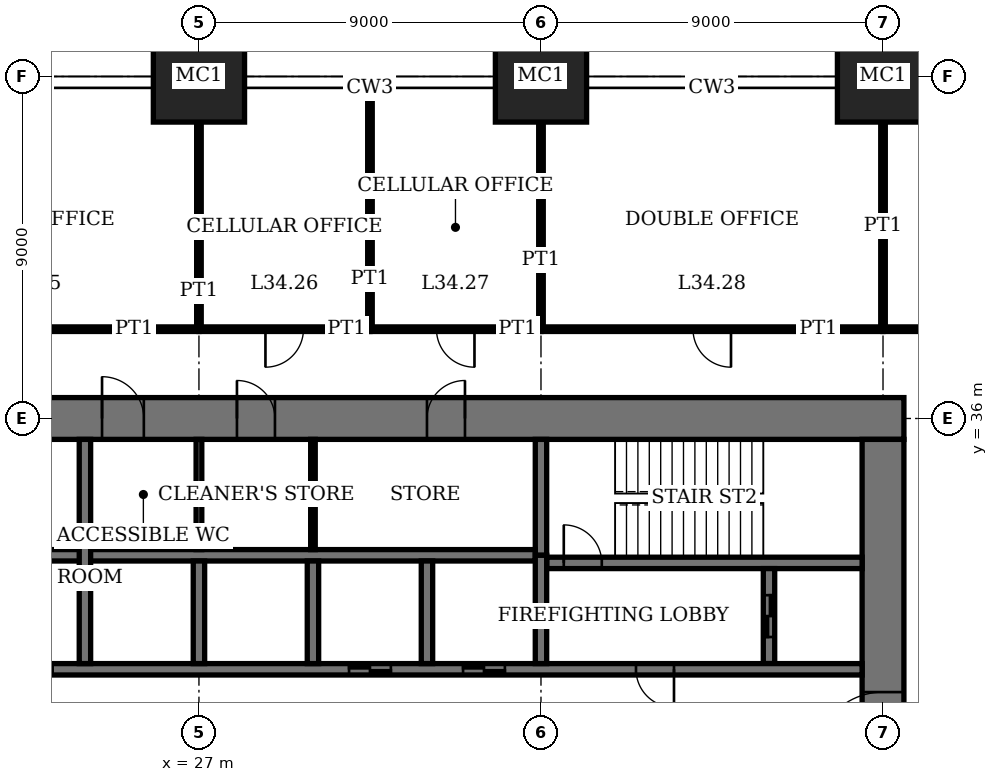
"""IFC4 building model, lengths in metres.
Left out: names, types, materials, properties, quantities, classifications, styles, units other than length and angle.
Written with IfcOpenShell. Run it as: python <this file> out.ifc"""

import sys

from ifc_helpers import new_model, si_unit, direction, frame, frame_2d, origin, origin_2d, place, context, subcontext, project, spatial, rectangle, extrude, element, fill, save


model = new_model("IFC4")
c1 = context("Model", 3, precision=1e-05, world=origin(), true_north=direction((0.0, 1.0)))
c2 = subcontext(c1, "Body", "Model", "MODEL_VIEW")
j1 = project(units=[si_unit("LENGTHUNIT", "METRE"), si_unit("PLANEANGLEUNIT", "RADIAN")], contexts=[c1])
p1 = place(None, origin())
s1 = spatial("IfcSite", under=j1, at=p1, CompositionType="ELEMENT")
p2 = place(p1, origin())
s2 = spatial("IfcBuilding", under=s1, at=p2, CompositionType="ELEMENT")
p3 = place(p2, frame((0.0, 0.0, 141.0)))
s3 = spatial("IfcBuildingStorey", under=s2, at=p3, CompositionType="ELEMENT", Elevation=141.0)
for number, where, z_axis, x_axis in (
    (1, (27.0, 45.0, 0.0), (0.0, 0.0, 1.0), (1.0, 0.0, 0.0)),
    (2, (36.0, 45.0, 0.0), (0.0, 0.0, 1.0), (1.0, 0.0, 0.0)),
    (3, (45.0, 45.0, 0.0), (0.0, 0.0, 1.0), (1.0, 0.0, 0.0)),
):
    element("IfcColumn", number, at=place(p3, frame(where, z_axis=z_axis, x_axis=x_axis)), inside=s3, PredefinedType="COLUMN", context=c2, shape_type="SweptSolid", body=[
        extrude(rectangle(XDim=2.4, YDim=2.4, at=origin_2d()), origin(), (0.0, 0.0, 1.0), 4.0),
    ])
p4 = place(p3, frame((45.55, 36.0, 0.0), z_axis=(0.0, 0.0, 1.0), x_axis=(-1.0, 0.0, 0.0)))
e4 = element("IfcWall", 4, at=p4, inside=s3, PredefinedType="SHEAR", context=c2, shape_type="SweptSolid", body=[
    extrude(rectangle(XDim=28.1, YDim=1.1, at=frame_2d((14.05, 0.0))), origin(), (0.0, 0.0, 1.0), 4.0),
])
p5 = place(p4, frame((11.55, 0.0, 0.0)))
e5 = element("IfcOpeningElement", 5, at=p5, cuts=e4, PredefinedType="OPENING", context=c2, shape_type="SweptSolid", body=[
    extrude(rectangle(XDim=1.0, YDim=2.4, at=frame_2d((0.5, 1.2))), frame((0.0, 0.56, 0.0), z_axis=(0.0, -1.0, 0.0), x_axis=(1.0, 0.0, 0.0)), (0.0, 0.0, 1.0), 1.12),
])
p6 = place(p4, frame((16.55, 0.0, 0.0)))
e6 = element("IfcOpeningElement", 6, at=p6, cuts=e4, PredefinedType="OPENING", context=c2, shape_type="SweptSolid", body=[
    extrude(rectangle(XDim=1.0, YDim=2.4, at=frame_2d((0.5, 1.2))), frame((0.0, 0.56, 0.0), z_axis=(0.0, -1.0, 0.0), x_axis=(1.0, 0.0, 0.0)), (0.0, 0.0, 1.0), 1.12),
])
p7 = place(p4, frame((20.0, 0.0, 0.0)))
e7 = element("IfcOpeningElement", 7, at=p7, cuts=e4, PredefinedType="OPENING", context=c2, shape_type="SweptSolid", body=[
    extrude(rectangle(XDim=1.1, YDim=2.4, at=frame_2d((0.55, 1.2))), frame((0.0, 0.56, 0.0), z_axis=(0.0, -1.0, 0.0), x_axis=(1.0, 0.0, 0.0)), (0.0, 0.0, 1.0), 1.12),
])
p8 = place(p4, frame((24.05, 0.0, 0.0)))
e8 = element("IfcOpeningElement", 8, at=p8, cuts=e4, PredefinedType="OPENING", context=c2, shape_type="SweptSolid", body=[
    extrude(rectangle(XDim=1.0, YDim=2.4, at=frame_2d((0.5, 1.2))), frame((0.0, 0.56, 0.0), z_axis=(0.0, -1.0, 0.0), x_axis=(1.0, 0.0, 0.0)), (0.0, 0.0, 1.0), 1.12),
])
p9 = place(p3, frame((45.0, 18.55, 0.0), z_axis=(0.0, 0.0, 1.0), x_axis=(0.0, 1.0, 0.0)))
e9 = element("IfcWall", 9, at=p9, inside=s3, PredefinedType="SHEAR", context=c2, shape_type="SweptSolid", body=[
    extrude(rectangle(XDim=16.9, YDim=1.1, at=frame_2d((8.45, 0.0))), origin(), (0.0, 0.0, 1.0), 4.0),
])
p10 = place(p9, frame((8.45, 0.0, 0.0)))
e10 = element("IfcOpeningElement", 10, at=p10, cuts=e9, PredefinedType="OPENING", context=c2, shape_type="SweptSolid", body=[
    extrude(rectangle(XDim=1.8, YDim=2.4, at=frame_2d((0.9, 1.2))), frame((0.0, 0.56, 0.0), z_axis=(0.0, -1.0, 0.0), x_axis=(1.0, 0.0, 0.0)), (0.0, 0.0, 1.0), 1.12),
])
p11 = place(p3, frame((36.15, 32.2, 0.0), z_axis=(0.0, 0.0, 1.0), x_axis=(1.0, 0.0, 0.0)))
e11 = element("IfcWall", 11, at=p11, inside=s3, PredefinedType="SHEAR", context=c2, shape_type="SweptSolid", body=[
    extrude(rectangle(XDim=8.3, YDim=0.3, at=frame_2d((4.15, 0.0))), origin(), (0.0, 0.0, 1.0), 4.0),
])
p12 = place(p11, frame((0.45, 0.0, 0.0)))
e12 = element("IfcOpeningElement", 12, at=p12, cuts=e11, PredefinedType="OPENING", context=c2, shape_type="SweptSolid", body=[
    extrude(rectangle(XDim=1.0, YDim=2.4, at=frame_2d((0.5, 1.2))), frame((0.0, 0.16, 0.0), z_axis=(0.0, -1.0, 0.0), x_axis=(1.0, 0.0, 0.0)), (0.0, 0.0, 1.0), 0.32),
])
p13 = place(p3, frame((36.0, 32.4, 0.0), z_axis=(0.0, 0.0, 1.0), x_axis=(0.0, 1.0, 0.0)))
e13 = element("IfcWall", 13, at=p13, inside=s3, PredefinedType="SHEAR", context=c2, shape_type="SweptSolid", body=[
    extrude(rectangle(XDim=3.05, YDim=0.3, at=frame_2d((1.525, 0.0))), origin(), (0.0, 0.0, 1.0), 4.0),
])
p14 = place(p3, frame((42.0, 29.55, 0.0), z_axis=(0.0, 0.0, 1.0), x_axis=(0.0, 1.0, 0.0)))
e14 = element("IfcWall", 14, at=p14, inside=s3, PredefinedType="SHEAR", context=c2, shape_type="SweptSolid", body=[
    extrude(rectangle(XDim=2.5, YDim=0.3, at=frame_2d((1.25, 0.0))), origin(), (0.0, 0.0, 1.0), 4.0),
])
p15 = place(p14, frame((0.7, 0.0, 0.0)))
e15 = element("IfcOpeningElement", 15, at=p15, cuts=e14, PredefinedType="OPENING", context=c2, shape_type="SweptSolid", body=[
    extrude(rectangle(XDim=1.1, YDim=2.4, at=frame_2d((0.55, 1.2))), frame((0.0, 0.16, 0.0), z_axis=(0.0, -1.0, 0.0), x_axis=(1.0, 0.0, 0.0)), (0.0, 0.0, 1.0), 0.32),
])
p16 = place(p3, frame((18.55, 29.4, 0.0), z_axis=(0.0, 0.0, 1.0), x_axis=(1.0, 0.0, 0.0)))
e16 = element("IfcWall", 16, at=p16, inside=s3, PredefinedType="SHEAR", context=c2, shape_type="SweptSolid", body=[
    extrude(rectangle(XDim=25.9, YDim=0.3, at=frame_2d((12.95, 0.0))), origin(), (0.0, 0.0, 1.0), 4.0),
])
p17 = place(p16, frame((19.95, 0.0, 0.0)))
e17 = element("IfcOpeningElement", 17, at=p17, cuts=e16, PredefinedType="OPENING", context=c2, shape_type="SweptSolid", body=[
    extrude(rectangle(XDim=1.0, YDim=2.4, at=frame_2d((0.5, 1.2))), frame((0.0, 0.16, 0.0), z_axis=(0.0, -1.0, 0.0), x_axis=(1.0, 0.0, 0.0)), (0.0, 0.0, 1.0), 0.32),
])
p18 = place(p16, frame((0.5, 0.0, 0.0)))
e18 = element("IfcOpeningElement", 18, at=p18, cuts=e16, PredefinedType="OPENING", context=c2, shape_type="SweptSolid", body=[
    extrude(rectangle(XDim=0.9, YDim=2.1, at=frame_2d((0.45, 1.05))), frame((0.0, 0.16, 0.0), z_axis=(0.0, -1.0, 0.0), x_axis=(1.0, 0.0, 0.0)), (0.0, 0.0, 1.0), 0.32),
])
p19 = place(p16, frame((15.4, 0.0, 0.0)))
e19 = element("IfcOpeningElement", 19, at=p19, cuts=e16, PredefinedType="OPENING", context=c2, shape_type="SweptSolid", body=[
    extrude(rectangle(XDim=1.1, YDim=2.4, at=frame_2d((0.55, 1.2))), frame((0.0, 0.16, 0.0), z_axis=(0.0, -1.0, 0.0), x_axis=(1.0, 0.0, 0.0)), (0.0, 0.0, 1.0), 0.32),
])
p20 = place(p16, frame((12.4, 0.0, 0.0)))
e20 = element("IfcOpeningElement", 20, at=p20, cuts=e16, PredefinedType="OPENING", context=c2, shape_type="SweptSolid", body=[
    extrude(rectangle(XDim=1.1, YDim=2.4, at=frame_2d((0.55, 1.2))), frame((0.0, 0.16, 0.0), z_axis=(0.0, -1.0, 0.0), x_axis=(1.0, 0.0, 0.0)), (0.0, 0.0, 1.0), 0.32),
])
p21 = place(p16, frame((3.3, 0.0, 0.0)))
e21 = element("IfcOpeningElement", 21, at=p21, cuts=e16, PredefinedType="OPENING", context=c2, shape_type="SweptSolid", body=[
    extrude(rectangle(XDim=1.3, YDim=2.4, at=frame_2d((0.65, 1.2))), frame((0.0, 0.16, 0.0), z_axis=(0.0, -1.0, 0.0), x_axis=(1.0, 0.0, 0.0)), (0.0, 0.0, 1.0), 0.32),
])
p22 = place(p3, frame((18.55, 32.4, 0.0), z_axis=(0.0, 0.0, 1.0), x_axis=(1.0, 0.0, 0.0)))
e22 = element("IfcWall", 22, at=p22, inside=s3, PredefinedType="SHEAR", context=c2, shape_type="SweptSolid", body=[
    extrude(rectangle(XDim=17.3, YDim=0.3, at=frame_2d((8.65, 0.0))), origin(), (0.0, 0.0, 1.0), 4.0),
])
for number, where, z_axis, x_axis in (
    (23, (33.0, 29.55, 0.0), (0.0, 0.0, 1.0), (0.0, 1.0, 0.0)),
    (24, (30.0, 29.55, 0.0), (0.0, 0.0, 1.0), (0.0, 1.0, 0.0)),
    (25, (27.0, 29.55, 0.0), (0.0, 0.0, 1.0), (0.0, 1.0, 0.0)),
):
    element("IfcWall", number, at=place(p3, frame(where, z_axis=z_axis, x_axis=x_axis)), inside=s3, PredefinedType="SHEAR", context=c2, shape_type="SweptSolid", body=[
        extrude(rectangle(XDim=2.7, YDim=0.3, at=frame_2d((1.35, 0.0))), origin(), (0.0, 0.0, 1.0), 4.0),
    ])
p23 = place(p3, frame((24.0, 29.55, 0.0), z_axis=(0.0, 0.0, 1.0), x_axis=(0.0, 1.0, 0.0)))
e26 = element("IfcWall", 26, at=p23, inside=s3, PredefinedType="SHEAR", context=c2, shape_type="SweptSolid", body=[
    extrude(rectangle(XDim=5.9, YDim=0.3, at=frame_2d((2.95, 0.0))), origin(), (0.0, 0.0, 1.0), 4.0),
])
p24 = place(p3, frame((36.0, 29.55, 0.0), z_axis=(0.0, 0.0, 1.0), x_axis=(0.0, 1.0, 0.0)))
e27 = element("IfcWall", 27, at=p24, inside=s3, PredefinedType="SHEAR", context=c2, shape_type="SweptSolid", body=[
    extrude(rectangle(XDim=2.85, YDim=0.3, at=frame_2d((1.425, 0.0))), origin(), (0.0, 0.0, 1.0), 4.0),
])
p25 = place(p3, frame((18.0, 38.35, 0.0), z_axis=(0.0, 0.0, 1.0), x_axis=(1.0, 0.0, 0.0)))
e28 = element("IfcWall", 28, at=p25, inside=s3, PredefinedType="PARTITIONING", context=c2, shape_type="SweptSolid", body=[
    extrude(rectangle(XDim=9.0, YDim=0.12, at=frame_2d((4.5, 0.0))), origin(), (0.0, 0.0, 1.0), 3.75),
])
p26 = place(p25, frame((4.0, 0.0, 0.0)))
e29 = element("IfcOpeningElement", 29, at=p26, cuts=e28, PredefinedType="OPENING", context=c2, shape_type="SweptSolid", body=[
    extrude(rectangle(XDim=1.0, YDim=2.4, at=frame_2d((0.5, 1.2))), frame((0.0, 0.07, 0.0), z_axis=(0.0, -1.0, 0.0), x_axis=(1.0, 0.0, 0.0)), (0.0, 0.0, 1.0), 0.14),
])
p27 = place(p3, frame((27.0, 38.35, 0.0), z_axis=(0.0, 0.0, 1.0), x_axis=(1.0, 0.0, 0.0)))
e30 = element("IfcWall", 30, at=p27, inside=s3, PredefinedType="PARTITIONING", context=c2, shape_type="SweptSolid", body=[
    extrude(rectangle(XDim=4.5, YDim=0.12, at=frame_2d((2.25, 0.0))), origin(), (0.0, 0.0, 1.0), 3.75),
])
p28 = place(p27, frame((1.75, 0.0, 0.0)))
e31 = element("IfcOpeningElement", 31, at=p28, cuts=e30, PredefinedType="OPENING", context=c2, shape_type="SweptSolid", body=[
    extrude(rectangle(XDim=1.0, YDim=2.4, at=frame_2d((0.5, 1.2))), frame((0.0, 0.07, 0.0), z_axis=(0.0, -1.0, 0.0), x_axis=(1.0, 0.0, 0.0)), (0.0, 0.0, 1.0), 0.14),
])
p29 = place(p3, frame((31.5, 38.35, 0.0), z_axis=(0.0, 0.0, 1.0), x_axis=(1.0, 0.0, 0.0)))
e32 = element("IfcWall", 32, at=p29, inside=s3, PredefinedType="PARTITIONING", context=c2, shape_type="SweptSolid", body=[
    extrude(rectangle(XDim=4.5, YDim=0.12, at=frame_2d((2.25, 0.0))), origin(), (0.0, 0.0, 1.0), 3.75),
])
p30 = place(p29, frame((1.75, 0.0, 0.0)))
e33 = element("IfcOpeningElement", 33, at=p30, cuts=e32, PredefinedType="OPENING", context=c2, shape_type="SweptSolid", body=[
    extrude(rectangle(XDim=1.0, YDim=2.4, at=frame_2d((0.5, 1.2))), frame((0.0, 0.07, 0.0), z_axis=(0.0, -1.0, 0.0), x_axis=(1.0, 0.0, 0.0)), (0.0, 0.0, 1.0), 0.14),
])
p31 = place(p3, frame((36.0, 38.35, 0.0), z_axis=(0.0, 0.0, 1.0), x_axis=(1.0, 0.0, 0.0)))
e34 = element("IfcWall", 34, at=p31, inside=s3, PredefinedType="PARTITIONING", context=c2, shape_type="SweptSolid", body=[
    extrude(rectangle(XDim=9.0, YDim=0.12, at=frame_2d((4.5, 0.0))), origin(), (0.0, 0.0, 1.0), 3.75),
])
p32 = place(p31, frame((4.0, 0.0, 0.0)))
e35 = element("IfcOpeningElement", 35, at=p32, cuts=e34, PredefinedType="OPENING", context=c2, shape_type="SweptSolid", body=[
    extrude(rectangle(XDim=1.0, YDim=2.4, at=frame_2d((0.5, 1.2))), frame((0.0, 0.07, 0.0), z_axis=(0.0, -1.0, 0.0), x_axis=(1.0, 0.0, 0.0)), (0.0, 0.0, 1.0), 0.14),
])
p33 = place(p3, frame((45.0, 38.35, 0.0), z_axis=(0.0, 0.0, 1.0), x_axis=(1.0, 0.0, 0.0)))
e36 = element("IfcWall", 36, at=p33, inside=s3, PredefinedType="PARTITIONING", context=c2, shape_type="SweptSolid", body=[
    extrude(rectangle(XDim=9.0, YDim=0.12, at=frame_2d((4.5, 0.0))), origin(), (0.0, 0.0, 1.0), 3.75),
])
p34 = place(p33, frame((4.0, 0.0, 0.0)))
e37 = element("IfcOpeningElement", 37, at=p34, cuts=e36, PredefinedType="OPENING", context=c2, shape_type="SweptSolid", body=[
    extrude(rectangle(XDim=1.0, YDim=2.4, at=frame_2d((0.5, 1.2))), frame((0.0, 0.07, 0.0), z_axis=(0.0, -1.0, 0.0), x_axis=(1.0, 0.0, 0.0)), (0.0, 0.0, 1.0), 0.14),
])
p35 = place(p3, frame((27.0, 38.35, 0.0), z_axis=(0.0, 0.0, 1.0), x_axis=(0.0, 1.0, 0.0)))
e38 = element("IfcWall", 38, at=p35, inside=s3, PredefinedType="PARTITIONING", context=c2, shape_type="SweptSolid", body=[
    extrude(rectangle(XDim=5.45, YDim=0.12, at=frame_2d((2.725, 0.0))), origin(), (0.0, 0.0, 1.0), 3.05),
])
p36 = place(p3, frame((31.5, 38.35, 0.0), z_axis=(0.0, 0.0, 1.0), x_axis=(0.0, 1.0, 0.0)))
e39 = element("IfcWall", 39, at=p36, inside=s3, PredefinedType="PARTITIONING", context=c2, shape_type="SweptSolid", body=[
    extrude(rectangle(XDim=6.34, YDim=0.12, at=frame_2d((3.17, 0.0))), origin(), (0.0, 0.0, 1.0), 3.75),
])
for number, where, z_axis, x_axis in (
    (40, (36.0, 38.35, 0.0), (0.0, 0.0, 1.0), (0.0, 1.0, 0.0)),
    (41, (45.0, 38.35, 0.0), (0.0, 0.0, 1.0), (0.0, 1.0, 0.0)),
):
    element("IfcWall", number, at=place(p3, frame(where, z_axis=z_axis, x_axis=x_axis)), inside=s3, PredefinedType="PARTITIONING", context=c2, shape_type="SweptSolid", body=[
        extrude(rectangle(XDim=5.45, YDim=0.12, at=frame_2d((2.725, 0.0))), origin(), (0.0, 0.0, 1.0), 3.05),
    ])
p37 = place(p3, frame((30.0, 32.55, 0.0), z_axis=(0.0, 0.0, 1.0), x_axis=(0.0, 1.0, 0.0)))
e42 = element("IfcWall", 42, at=p37, inside=s3, PredefinedType="PARTITIONING", context=c2, shape_type="SweptSolid", body=[
    extrude(rectangle(XDim=2.9, YDim=0.12, at=frame_2d((1.45, 0.0))), origin(), (0.0, 0.0, 1.0), 3.75),
])
p38 = place(p3, frame((27.0, 32.55, 0.0), z_axis=(0.0, 0.0, 1.0), x_axis=(0.0, 1.0, 0.0)))
e43 = element("IfcWall", 43, at=p38, inside=s3, PredefinedType="PARTITIONING", context=c2, shape_type="SweptSolid", body=[
    extrude(rectangle(XDim=2.9, YDim=0.15, at=frame_2d((1.45, 0.0))), origin(), (0.0, 0.0, 1.0), 3.75),
])
p39 = place(p10, origin())
e44 = element("IfcDoor", 44, at=p39, inside=s3, OperationType="DOUBLE_DOOR_DOUBLE_SWING", PredefinedType="DOOR", context=c2, shape_type="SweptSolid", body=[
    extrude(rectangle(XDim=1.8, YDim=2.4, at=frame_2d((0.9, 1.2))), frame((0.0, 0.03, 0.0), z_axis=(0.0, -1.0, 0.0), x_axis=(1.0, 0.0, 0.0)), (0.0, 0.0, 1.0), 0.06),
    extrude(rectangle(XDim=0.04, YDim=2.4, at=frame_2d((0.02, 1.2))), frame((0.0, 0.55, 0.0), z_axis=(0.0, -1.0, 0.0), x_axis=(1.0, 0.0, 0.0)), (0.0, 0.0, 1.0), 1.1),
    extrude(rectangle(XDim=0.04, YDim=2.4, at=frame_2d((1.78, 1.2))), frame((0.0, 0.55, 0.0), z_axis=(0.0, -1.0, 0.0), x_axis=(1.0, 0.0, 0.0)), (0.0, 0.0, 1.0), 1.1),
    extrude(rectangle(XDim=1.8, YDim=0.04, at=frame_2d((0.9, 2.38))), frame((0.0, 0.55, 0.0), z_axis=(0.0, -1.0, 0.0), x_axis=(1.0, 0.0, 0.0)), (0.0, 0.0, 1.0), 1.1),
])
fill(e10, e44)
p40 = place(p5, origin())
e45 = element("IfcDoor", 45, at=p40, inside=s3, OperationType="SINGLE_SWING_LEFT", PredefinedType="DOOR", context=c2, shape_type="SweptSolid", body=[
    extrude(rectangle(XDim=1.0, YDim=2.4, at=frame_2d((0.5, 1.2))), frame((0.0, 0.025, 0.0), z_axis=(0.0, -1.0, 0.0), x_axis=(1.0, 0.0, 0.0)), (0.0, 0.0, 1.0), 0.05),
    extrude(rectangle(XDim=0.04, YDim=2.4, at=frame_2d((0.02, 1.2))), frame((0.0, 0.4, 0.0), z_axis=(0.0, -1.0, 0.0), x_axis=(1.0, 0.0, 0.0)), (0.0, 0.0, 1.0), 0.8),
    extrude(rectangle(XDim=0.04, YDim=2.4, at=frame_2d((0.98, 1.2))), frame((0.0, 0.4, 0.0), z_axis=(0.0, -1.0, 0.0), x_axis=(1.0, 0.0, 0.0)), (0.0, 0.0, 1.0), 0.8),
    extrude(rectangle(XDim=1.0, YDim=0.04, at=frame_2d((0.5, 2.38))), frame((0.0, 0.4, 0.0), z_axis=(0.0, -1.0, 0.0), x_axis=(1.0, 0.0, 0.0)), (0.0, 0.0, 1.0), 0.8),
])
fill(e5, e45)
p41 = place(p6, origin())
e46 = element("IfcDoor", 46, at=p41, inside=s3, OperationType="SINGLE_SWING_RIGHT", PredefinedType="DOOR", context=c2, shape_type="SweptSolid", body=[
    extrude(rectangle(XDim=1.0, YDim=2.4, at=frame_2d((0.5, 1.2))), frame((0.0, 0.025, 0.0), z_axis=(0.0, -1.0, 0.0), x_axis=(1.0, 0.0, 0.0)), (0.0, 0.0, 1.0), 0.05),
    extrude(rectangle(XDim=0.04, YDim=2.4, at=frame_2d((0.02, 1.2))), frame((0.0, 0.4, 0.0), z_axis=(0.0, -1.0, 0.0), x_axis=(1.0, 0.0, 0.0)), (0.0, 0.0, 1.0), 0.8),
    extrude(rectangle(XDim=0.04, YDim=2.4, at=frame_2d((0.98, 1.2))), frame((0.0, 0.4, 0.0), z_axis=(0.0, -1.0, 0.0), x_axis=(1.0, 0.0, 0.0)), (0.0, 0.0, 1.0), 0.8),
    extrude(rectangle(XDim=1.0, YDim=0.04, at=frame_2d((0.5, 2.38))), frame((0.0, 0.4, 0.0), z_axis=(0.0, -1.0, 0.0), x_axis=(1.0, 0.0, 0.0)), (0.0, 0.0, 1.0), 0.8),
])
fill(e6, e46)
p42 = place(p7, origin())
e47 = element("IfcDoor", 47, at=p42, inside=s3, OperationType="SINGLE_SWING_RIGHT", PredefinedType="DOOR", context=c2, shape_type="SweptSolid", body=[
    extrude(rectangle(XDim=1.1, YDim=2.4, at=frame_2d((0.55, 1.2))), frame((0.0, 0.025, 0.0), z_axis=(0.0, -1.0, 0.0), x_axis=(1.0, 0.0, 0.0)), (0.0, 0.0, 1.0), 0.05),
    extrude(rectangle(XDim=0.04, YDim=2.4, at=frame_2d((0.02, 1.2))), frame((0.0, 0.44, 0.0), z_axis=(0.0, -1.0, 0.0), x_axis=(1.0, 0.0, 0.0)), (0.0, 0.0, 1.0), 0.88),
    extrude(rectangle(XDim=0.04, YDim=2.4, at=frame_2d((1.08, 1.2))), frame((0.0, 0.44, 0.0), z_axis=(0.0, -1.0, 0.0), x_axis=(1.0, 0.0, 0.0)), (0.0, 0.0, 1.0), 0.88),
    extrude(rectangle(XDim=1.1, YDim=0.04, at=frame_2d((0.55, 2.38))), frame((0.0, 0.44, 0.0), z_axis=(0.0, -1.0, 0.0), x_axis=(1.0, 0.0, 0.0)), (0.0, 0.0, 1.0), 0.88),
])
fill(e7, e47)
p43 = place(p12, origin())
e48 = element("IfcDoor", 48, at=p43, inside=s3, OperationType="SINGLE_SWING_RIGHT", PredefinedType="DOOR", context=c2, shape_type="SweptSolid", body=[
    extrude(rectangle(XDim=1.0, YDim=2.4, at=frame_2d((0.5, 1.2))), frame((0.0, 0.03, 0.0), z_axis=(0.0, -1.0, 0.0), x_axis=(1.0, 0.0, 0.0)), (0.0, 0.0, 1.0), 0.06),
])
fill(e12, e48)
p44 = place(p17, origin())
e49 = element("IfcDoor", 49, at=p44, inside=s3, OperationType="SINGLE_SWING_RIGHT", PredefinedType="DOOR", context=c2, shape_type="SweptSolid", body=[
    extrude(rectangle(XDim=1.0, YDim=2.4, at=frame_2d((0.5, 1.2))), frame((0.0, 0.03, 0.0), z_axis=(0.0, -1.0, 0.0), x_axis=(1.0, 0.0, 0.0)), (0.0, 0.0, 1.0), 0.06),
])
fill(e17, e49)
p45 = place(p28, origin())
e50 = element("IfcDoor", 50, at=p45, inside=s3, OperationType="SINGLE_SWING_LEFT", PredefinedType="DOOR", context=c2, shape_type="SweptSolid", body=[
    extrude(rectangle(XDim=1.0, YDim=2.4, at=frame_2d((0.5, 1.2))), frame((0.0, 0.025, 0.0), z_axis=(0.0, -1.0, 0.0), x_axis=(1.0, 0.0, 0.0)), (0.0, 0.0, 1.0), 0.05),
])
fill(e31, e50)
p46 = place(p30, origin())
e51 = element("IfcDoor", 51, at=p46, inside=s3, OperationType="SINGLE_SWING_RIGHT", PredefinedType="DOOR", context=c2, shape_type="SweptSolid", body=[
    extrude(rectangle(XDim=1.0, YDim=2.4, at=frame_2d((0.5, 1.2))), frame((0.0, 0.025, 0.0), z_axis=(0.0, -1.0, 0.0), x_axis=(1.0, 0.0, 0.0)), (0.0, 0.0, 1.0), 0.05),
])
fill(e33, e51)
p47 = place(p32, origin())
e52 = element("IfcDoor", 52, at=p47, inside=s3, OperationType="SINGLE_SWING_RIGHT", PredefinedType="DOOR", context=c2, shape_type="SweptSolid", body=[
    extrude(rectangle(XDim=1.0, YDim=2.4, at=frame_2d((0.5, 1.2))), frame((0.0, 0.025, 0.0), z_axis=(0.0, -1.0, 0.0), x_axis=(1.0, 0.0, 0.0)), (0.0, 0.0, 1.0), 0.05),
])
fill(e35, e52)
p48 = place(p19, origin())
e53 = element("IfcDoor", 53, at=p48, inside=s3, OperationType="DOUBLE_DOOR_SLIDING", PredefinedType="DOOR", context=c2, shape_type="SweptSolid", body=[
    extrude(rectangle(XDim=1.1, YDim=2.4, at=frame_2d((0.55, 1.2))), frame((0.0, 0.02, 0.0), z_axis=(0.0, -1.0, 0.0), x_axis=(1.0, 0.0, 0.0)), (0.0, 0.0, 1.0), 0.04),
])
fill(e19, e53)
p49 = place(p20, origin())
e54 = element("IfcDoor", 54, at=p49, inside=s3, OperationType="DOUBLE_DOOR_SLIDING", PredefinedType="DOOR", context=c2, shape_type="SweptSolid", body=[
    extrude(rectangle(XDim=1.1, YDim=2.4, at=frame_2d((0.55, 1.2))), frame((0.0, 0.02, 0.0), z_axis=(0.0, -1.0, 0.0), x_axis=(1.0, 0.0, 0.0)), (0.0, 0.0, 1.0), 0.04),
])
fill(e20, e54)
p50 = place(p21, origin())
e55 = element("IfcDoor", 55, at=p50, inside=s3, OperationType="DOUBLE_DOOR_SLIDING", PredefinedType="DOOR", context=c2, shape_type="SweptSolid", body=[
    extrude(rectangle(XDim=1.3, YDim=2.4, at=frame_2d((0.65, 1.2))), frame((0.0, 0.02, 0.0), z_axis=(0.0, -1.0, 0.0), x_axis=(1.0, 0.0, 0.0)), (0.0, 0.0, 1.0), 0.04),
])
fill(e21, e55)
p51 = place(p15, origin())
e56 = element("IfcDoor", 56, at=p51, inside=s3, OperationType="DOUBLE_DOOR_SLIDING", PredefinedType="DOOR", context=c2, shape_type="SweptSolid", body=[
    extrude(rectangle(XDim=1.1, YDim=2.4, at=frame_2d((0.55, 1.2))), frame((0.0, 0.03, 0.0), z_axis=(0.0, -1.0, 0.0), x_axis=(1.0, 0.0, 0.0)), (0.0, 0.0, 1.0), 0.06),
])
fill(e15, e56)
save(model, sys.argv[1])
